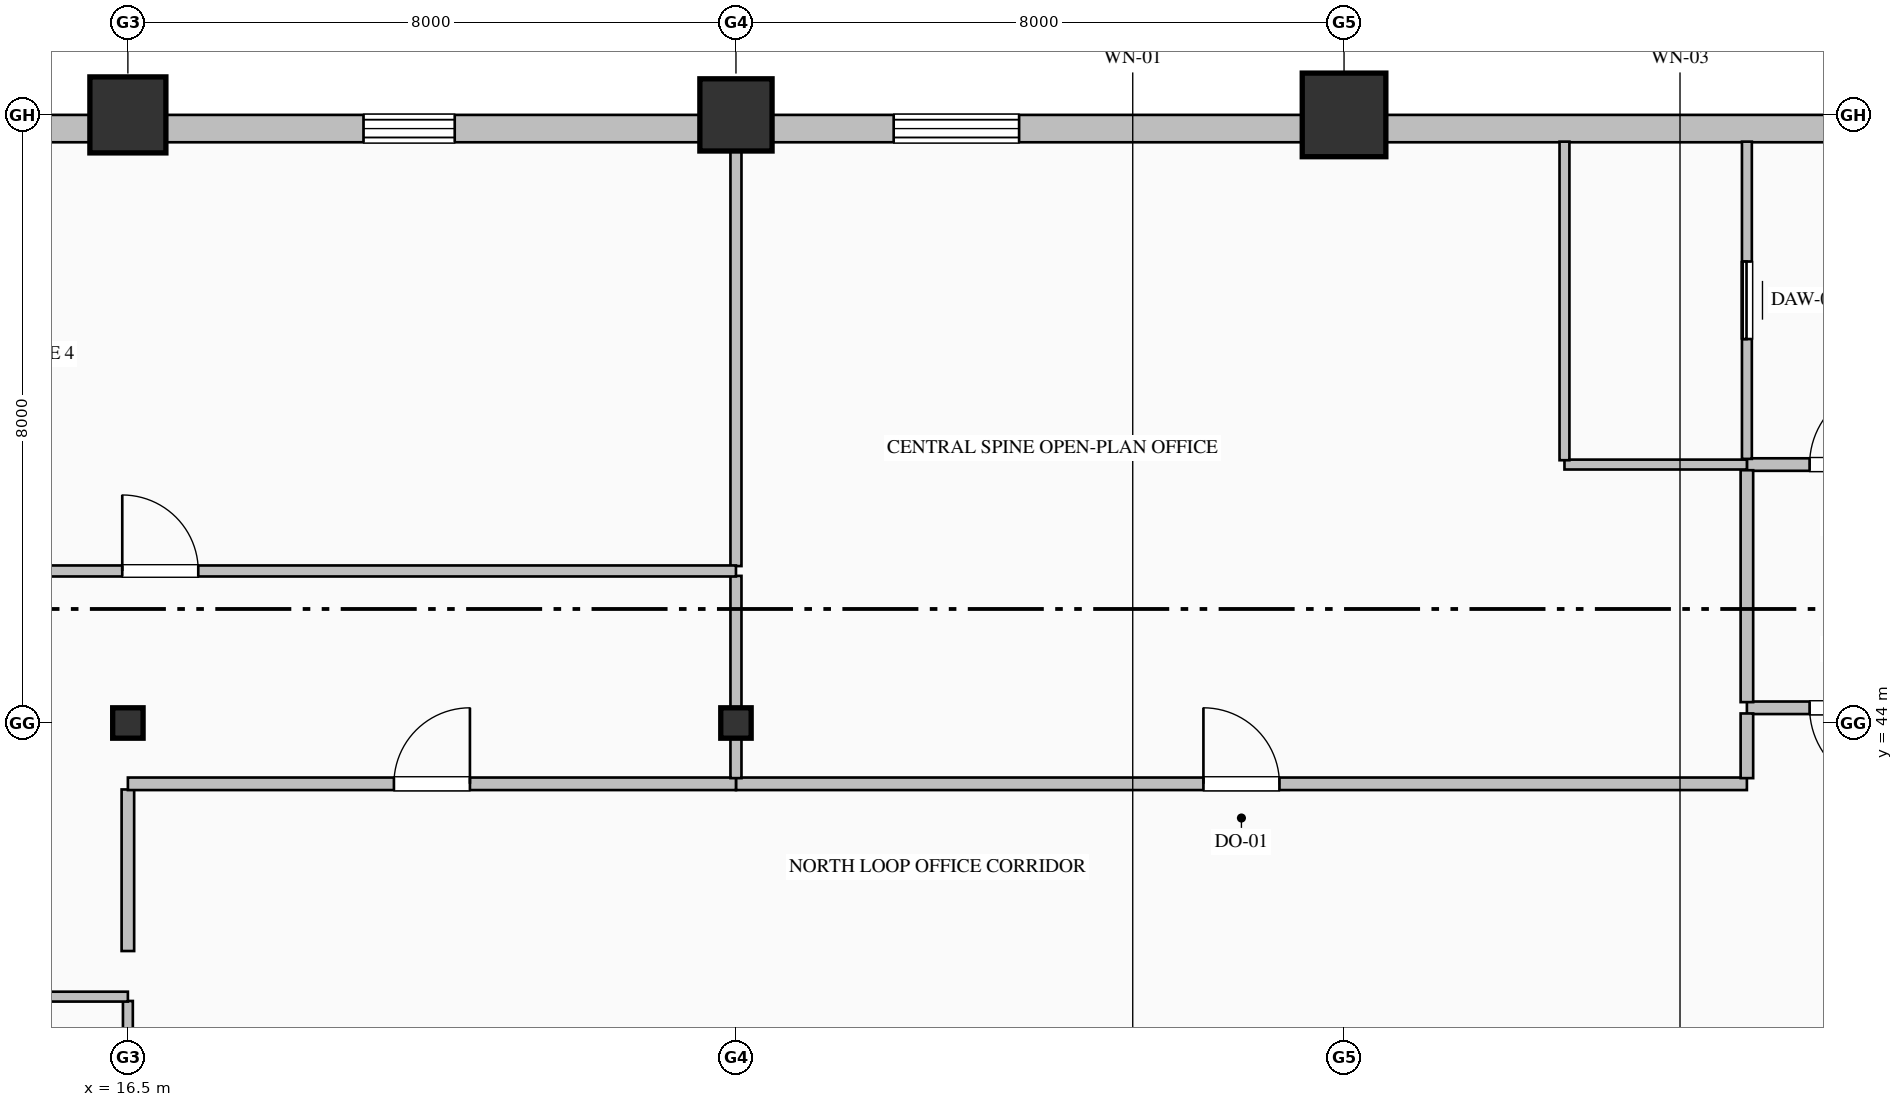
"""IFC4 building model, lengths in metres.
Left out: names, types, materials, properties, quantities, classifications, styles, units other than length and angle.
Written with IfcOpenShell. Run it as: python <this file> out.ifc"""

import sys

from ifc_helpers import new_model, si_unit, direction, frame, frame_2d, origin, origin_2d, place, context, subcontext, project, spatial, rectangle, hollow_rectangle, hollow_circle, i_section, extrude, element, fill, save


model = new_model("IFC4")
c1 = context("Model", 3, precision=1e-05, world=origin(), true_north=direction((0.0, 1.0)))
c2 = subcontext(c1, "Body", "Model", "MODEL_VIEW")
j1 = project(units=[si_unit("LENGTHUNIT", "METRE"), si_unit("PLANEANGLEUNIT", "RADIAN")], contexts=[c1])
p1 = place(None, origin())
s1 = spatial("IfcSite", under=j1, at=p1, CompositionType="ELEMENT")
p2 = place(p1, origin())
s2 = spatial("IfcBuilding", under=s1, at=p2, CompositionType="ELEMENT")
p3 = place(p2, frame((0.0, 0.0, 159.0)))
s3 = spatial("IfcBuildingStorey", under=s2, at=p3, CompositionType="ELEMENT", Elevation=159.0)
p4 = place(p3, frame((16.5, 44.0, 0.0), z_axis=(0.0, 0.0, 1.0), x_axis=(1.0, 0.0, 0.0)))
e1 = element("IfcColumn", 1, at=p4, inside=s3, PredefinedType="COLUMN", context=c2, shape_type="SweptSolid", body=[
    extrude(i_section(OverallWidth=0.4, OverallDepth=0.4, WebThickness=0.013, FlangeThickness=0.021, FilletRadius=0.022, at=origin_2d()), origin(), (0.0, 0.0, 1.0), 4.0),
])
p5 = place(p3, frame((16.5, 52.0, 0.0), z_axis=(0.0, 0.0, 1.0), x_axis=(1.0, 0.0, 0.0)))
e2 = element("IfcColumn", 2, at=p5, inside=s3, PredefinedType="COLUMN", context=c2, shape_type="SweptSolid", body=[
    extrude(hollow_circle(Radius=0.5, WallThickness=0.036, at=origin_2d()), origin(), (0.0, 0.0, 1.0), 4.0),
])
p6 = place(p3, frame((24.5, 44.0, 0.0), z_axis=(0.0, 0.0, 1.0), x_axis=(1.0, 0.0, 0.0)))
e3 = element("IfcColumn", 3, at=p6, inside=s3, PredefinedType="COLUMN", context=c2, shape_type="SweptSolid", body=[
    extrude(i_section(OverallWidth=0.4, OverallDepth=0.4, WebThickness=0.013, FlangeThickness=0.021, FilletRadius=0.022, at=origin_2d()), origin(), (0.0, 0.0, 1.0), 4.0),
])
p7 = place(p3, frame((24.5, 52.0, 0.0), z_axis=(0.0, 0.0, 1.0), x_axis=(1.0, 0.0, 0.0)))
e4 = element("IfcColumn", 4, at=p7, inside=s3, PredefinedType="COLUMN", context=c2, shape_type="SweptSolid", body=[
    extrude(hollow_rectangle(XDim=0.95, YDim=0.95, WallThickness=0.036, at=origin_2d()), origin(), (0.0, 0.0, 1.0), 4.0),
])
p8 = place(p3, frame((32.5, 52.0, 0.0), z_axis=(0.0, 0.0, 1.0), x_axis=(1.0, 0.0, 0.0)))
e5 = element("IfcColumn", 5, at=p8, inside=s3, PredefinedType="COLUMN", context=c2, shape_type="SweptSolid", body=[
    extrude(hollow_rectangle(XDim=1.1, YDim=1.1, WallThickness=0.04, at=origin_2d()), origin(), (0.0, 0.0, 1.0), 4.0),
])
p9 = place(p3, frame((13.0, 51.82, 0.0), z_axis=(0.0, 0.0, 1.0), x_axis=(1.0, 0.0, 0.0)))
e6 = element("IfcWall", 6, at=p9, inside=s3, PredefinedType="SOLIDWALL", context=c2, shape_type="SweptSolid", body=[
    extrude(rectangle(XDim=27.52, YDim=0.36, at=frame_2d((13.76, 0.0))), origin(), (0.0, 0.0, 1.0), 3.265),
])
p10 = place(p9, frame((6.6, 0.0, 0.7)))
e7 = element("IfcOpeningElement", 7, at=p10, cuts=e6, PredefinedType="OPENING", context=c2, shape_type="SweptSolid", body=[
    extrude(rectangle(XDim=1.2, YDim=1.85, at=frame_2d((0.6, 0.925))), frame((0.0, 0.19, 0.0), z_axis=(0.0, -1.0, 0.0), x_axis=(1.0, 0.0, 0.0)), (0.0, 0.0, 1.0), 0.38),
])
p11 = place(p9, frame((13.575, 0.0, 0.85)))
e8 = element("IfcOpeningElement", 8, at=p11, cuts=e6, PredefinedType="OPENING", context=c2, shape_type="SweptSolid", body=[
    extrude(rectangle(XDim=1.65, YDim=1.95, at=frame_2d((0.825, 0.975))), frame((0.0, 0.19, 0.0), z_axis=(0.0, -1.0, 0.0), x_axis=(1.0, 0.0, 0.0)), (0.0, 0.0, 1.0), 0.38),
])
p12 = place(p3, frame((37.8, 47.4, 0.0), z_axis=(0.0, 0.0, 1.0), x_axis=(1.0, 0.0, 0.0)))
e9 = element("IfcWall", 9, at=p12, inside=s3, PredefinedType="PARTITIONING", context=c2, shape_type="SweptSolid", body=[
    extrude(rectangle(XDim=2.7, YDim=0.165, at=frame_2d((1.35, 0.0))), origin(), (0.0, 0.0, 1.0), 3.765),
])
p13 = place(p12, frame((0.825, 0.0, 0.0)))
e10 = element("IfcOpeningElement", 10, at=p13, cuts=e9, PredefinedType="OPENING", context=c2, shape_type="SweptSolid", body=[
    extrude(rectangle(XDim=1.05, YDim=2.15, at=frame_2d((0.525, 1.075))), frame((0.0, 0.093, 0.0), z_axis=(0.0, -1.0, 0.0), x_axis=(1.0, 0.0, 0.0)), (0.0, 0.0, 1.0), 0.185),
])
p14 = place(p3, frame((40.5, 44.2, 0.0), z_axis=(0.0, 0.0, 1.0), x_axis=(-1.0, 0.0, 0.0)))
e11 = element("IfcWall", 11, at=p14, inside=s3, PredefinedType="PARTITIONING", context=c2, shape_type="SweptSolid", body=[
    extrude(rectangle(XDim=2.7, YDim=0.165, at=frame_2d((1.35, 0.0))), origin(), (0.0, 0.0, 1.0), 3.765),
])
p15 = place(p14, frame((0.825, 0.0, 0.0)))
e12 = element("IfcOpeningElement", 12, at=p15, cuts=e11, PredefinedType="OPENING", context=c2, shape_type="SweptSolid", body=[
    extrude(rectangle(XDim=1.05, YDim=2.15, at=frame_2d((0.525, 1.075))), frame((0.0, 0.093, 0.0), z_axis=(0.0, -1.0, 0.0), x_axis=(1.0, 0.0, 0.0)), (0.0, 0.0, 1.0), 0.185),
])
p16 = place(p3, frame((37.8, 44.274, 0.0), z_axis=(0.0, 0.0, 1.0), x_axis=(0.0, 1.0, 0.0)))
e13 = element("IfcWall", 13, at=p16, inside=s3, PredefinedType="PARTITIONING", context=c2, shape_type="SweptSolid", body=[
    extrude(rectangle(XDim=3.051, YDim=0.165, at=frame_2d((1.525, 0.0))), origin(), (0.0, 0.0, 1.0), 3.765),
])
p17 = place(p3, frame((37.8, 47.475, 0.0), z_axis=(0.0, 0.0, 1.0), x_axis=(0.0, 1.0, 0.0)))
e14 = element("IfcWall", 14, at=p17, inside=s3, PredefinedType="PARTITIONING", context=c2, shape_type="SweptSolid", body=[
    extrude(rectangle(XDim=4.173, YDim=0.13, at=frame_2d((2.087, 0.0))), origin(), (0.0, 0.0, 1.0), 3.765),
])
p18 = place(p17, frame((1.577, 0.0, 0.0)))
e15 = element("IfcOpeningElement", 15, at=p18, cuts=e14, PredefinedType="OPENING", context=c2, shape_type="SweptSolid", body=[
    extrude(rectangle(XDim=1.02, YDim=2.15, at=frame_2d((0.51, 1.075))), frame((0.0, 0.075, 0.0), z_axis=(0.0, -1.0, 0.0), x_axis=(1.0, 0.0, 0.0)), (0.0, 0.0, 1.0), 0.15),
])
p19 = place(p3, frame((37.8, 47.4, 0.0), z_axis=(0.0, 0.0, 1.0), x_axis=(-1.0, 0.0, 0.0)))
e16 = element("IfcWall", 16, at=p19, inside=s3, PredefinedType="PARTITIONING", context=c2, shape_type="SweptSolid", body=[
    extrude(rectangle(XDim=2.4, YDim=0.13, at=frame_2d((1.2, 0.0))), origin(), (0.0, 0.0, 1.0), 3.765),
])
p20 = place(p3, frame((35.4, 47.457, 0.0), z_axis=(0.0, 0.0, 1.0), x_axis=(0.0, 1.0, 0.0)))
e17 = element("IfcWall", 17, at=p20, inside=s3, PredefinedType="PARTITIONING", context=c2, shape_type="SweptSolid", body=[
    extrude(rectangle(XDim=4.191, YDim=0.13, at=frame_2d((2.095, 0.0))), origin(), (0.0, 0.0, 1.0), 3.765),
])
p21 = place(p3, frame((24.5, 43.2, 0.0), z_axis=(0.0, 0.0, 1.0), x_axis=(1.0, 0.0, 0.0)))
e18 = element("IfcWall", 18, at=p21, inside=s3, PredefinedType="PARTITIONING", context=c2, shape_type="SweptSolid", body=[
    extrude(rectangle(XDim=13.3, YDim=0.165, at=frame_2d((6.65, 0.0))), origin(), (0.0, 0.0, 1.0), 3.765),
])
p22 = place(p21, frame((6.15, 0.0, 0.0)))
e19 = element("IfcOpeningElement", 19, at=p22, cuts=e18, PredefinedType="OPENING", context=c2, shape_type="SweptSolid", body=[
    extrude(rectangle(XDim=1.0, YDim=2.15, at=frame_2d((0.5, 1.075))), frame((0.0, 0.093, 0.0), z_axis=(0.0, -1.0, 0.0), x_axis=(1.0, 0.0, 0.0)), (0.0, 0.0, 1.0), 0.185),
])
p23 = place(p3, frame((16.5, 41.0, 0.0), z_axis=(0.0, 0.0, 1.0), x_axis=(0.0, 1.0, 0.0)))
e20 = element("IfcWall", 20, at=p23, inside=s3, PredefinedType="PARTITIONING", context=c2, shape_type="SweptSolid", body=[
    extrude(rectangle(XDim=2.125, YDim=0.165, at=frame_2d((1.063, 0.0))), origin(), (0.0, 0.0, 1.0), 3.157),
])
p24 = place(p3, frame((16.5, 43.2, 0.0), z_axis=(0.0, 0.0, 1.0), x_axis=(1.0, 0.0, 0.0)))
e21 = element("IfcWall", 21, at=p24, inside=s3, PredefinedType="PARTITIONING", context=c2, shape_type="SweptSolid", body=[
    extrude(rectangle(XDim=8.0, YDim=0.165, at=frame_2d((4.0, 0.0))), origin(), (0.0, 0.0, 1.0), 3.765),
])
p25 = place(p24, frame((3.5, 0.0, 0.0)))
e22 = element("IfcOpeningElement", 22, at=p25, cuts=e21, PredefinedType="OPENING", context=c2, shape_type="SweptSolid", body=[
    extrude(rectangle(XDim=1.0, YDim=2.15, at=frame_2d((0.5, 1.075))), frame((0.0, 0.093, 0.0), z_axis=(0.0, -1.0, 0.0), x_axis=(1.0, 0.0, 0.0)), (0.0, 0.0, 1.0), 0.185),
])
p26 = place(p3, frame((16.5, 34.057, 0.0), z_axis=(0.0, 0.0, 1.0), x_axis=(0.0, 1.0, 0.0)))
e23 = element("IfcWall", 23, at=p26, inside=s3, PredefinedType="PARTITIONING", context=c2, shape_type="SweptSolid", body=[
    extrude(rectangle(XDim=6.286, YDim=0.13, at=frame_2d((3.143, 0.0))), origin(), (0.0, 0.0, 1.0), 3.157),
])
p27 = place(p26, frame((2.643, 0.0, 0.0)))
e24 = element("IfcOpeningElement", 24, at=p27, cuts=e23, PredefinedType="OPENING", context=c2, shape_type="SweptSolid", body=[
    extrude(rectangle(XDim=1.0, YDim=2.15, at=frame_2d((0.5, 1.075))), frame((0.0, 0.075, 0.0), z_axis=(0.0, -1.0, 0.0), x_axis=(1.0, 0.0, 0.0)), (0.0, 0.0, 1.0), 0.15),
])
p28 = place(p3, frame((37.8, 43.274, 0.0), z_axis=(0.0, 0.0, 1.0), x_axis=(0.0, 1.0, 0.0)))
e25 = element("IfcWall", 25, at=p28, inside=s3, PredefinedType="PARTITIONING", context=c2, shape_type="SweptSolid", body=[
    extrude(rectangle(XDim=0.851, YDim=0.165, at=frame_2d((0.426, 0.0))), origin(), (0.0, 0.0, 1.0), 3.765),
])
p29 = place(p3, frame((24.5, 43.274, 0.0), z_axis=(0.0, 0.0, 1.0), x_axis=(0.0, 1.0, 0.0)))
e26 = element("IfcWall", 26, at=p29, inside=s3, PredefinedType="PARTITIONING", context=c2, shape_type="SweptSolid", body=[
    extrude(rectangle(XDim=2.661, YDim=0.145, at=frame_2d((1.331, 0.0))), origin(), (0.0, 0.0, 1.0), 3.157),
])
p30 = place(p3, frame((24.5, 46.064, 0.0), z_axis=(0.0, 0.0, 1.0), x_axis=(0.0, 1.0, 0.0)))
e27 = element("IfcWall", 27, at=p30, inside=s3, PredefinedType="PARTITIONING", context=c2, shape_type="SweptSolid", body=[
    extrude(rectangle(XDim=5.583, YDim=0.145, at=frame_2d((2.792, 0.0))), origin(), (0.0, 0.0, 1.0), 3.157),
])
p31 = place(p3, frame((9.352, 40.4, 0.0), z_axis=(0.0, 0.0, 1.0), x_axis=(1.0, 0.0, 0.0)))
e28 = element("IfcWall", 28, at=p31, inside=s3, PredefinedType="PARTITIONING", context=c2, shape_type="SweptSolid", body=[
    extrude(rectangle(XDim=7.148, YDim=0.13, at=frame_2d((3.574, 0.0))), origin(), (0.0, 0.0, 1.0), 3.765),
])
p32 = place(p3, frame((9.352, 46.0, 0.0), z_axis=(0.0, 0.0, 1.0), x_axis=(1.0, 0.0, 0.0)))
e29 = element("IfcWall", 29, at=p32, inside=s3, PredefinedType="PARTITIONING", context=c2, shape_type="SweptSolid", body=[
    extrude(rectangle(XDim=15.148, YDim=0.145, at=frame_2d((7.574, 0.0))), origin(), (0.0, 0.0, 1.0), 3.765),
])
p33 = place(p32, frame((7.074, 0.0, 0.0)))
e30 = element("IfcOpeningElement", 30, at=p33, cuts=e29, PredefinedType="OPENING", context=c2, shape_type="SweptSolid", body=[
    extrude(rectangle(XDim=1.0, YDim=2.15, at=frame_2d((0.5, 1.075))), frame((0.0, 0.083, 0.0), z_axis=(0.0, -1.0, 0.0), x_axis=(1.0, 0.0, 0.0)), (0.0, 0.0, 1.0), 0.165),
])
p34 = place(p10, origin())
e31 = element("IfcWindow", 31, at=p34, inside=s3, PartitioningType="DOUBLE_PANEL_VERTICAL", PredefinedType="WINDOW", context=c2, shape_type="SweptSolid", body=[
    extrude(rectangle(XDim=1.2, YDim=1.85, at=frame_2d((0.6, 0.925))), frame((0.0, 0.15, 0.0), z_axis=(0.0, -1.0, 0.0), x_axis=(1.0, 0.0, 0.0)), (0.0, 0.0, 1.0), 0.06),
])
fill(e7, e31)
p35 = place(p11, origin())
e32 = element("IfcWindow", 32, at=p35, inside=s3, PartitioningType="DOUBLE_PANEL_VERTICAL", PredefinedType="WINDOW", context=c2, shape_type="SweptSolid", body=[
    extrude(rectangle(XDim=1.65, YDim=1.95, at=frame_2d((0.825, 0.975))), frame((0.0, 0.15, 0.0), z_axis=(0.0, -1.0, 0.0), x_axis=(1.0, 0.0, 0.0)), (0.0, 0.0, 1.0), 0.06),
])
fill(e8, e32)
p36 = place(p13, origin())
e33 = element("IfcDoor", 33, at=p36, inside=s3, OperationType="SINGLE_SWING_RIGHT", PredefinedType="DOOR", context=c2, shape_type="SweptSolid", body=[
    extrude(rectangle(XDim=1.05, YDim=2.15, at=frame_2d((0.525, 1.075))), frame((0.0, 0.025, 0.0), z_axis=(0.0, -1.0, 0.0), x_axis=(1.0, 0.0, 0.0)), (0.0, 0.0, 1.0), 0.05),
])
fill(e10, e33)
p37 = place(p15, origin())
e34 = element("IfcDoor", 34, at=p37, inside=s3, OperationType="SINGLE_SWING_LEFT", PredefinedType="DOOR", context=c2, shape_type="SweptSolid", body=[
    extrude(rectangle(XDim=1.05, YDim=2.15, at=frame_2d((0.525, 1.075))), frame((0.0, 0.025, 0.0), z_axis=(0.0, -1.0, 0.0), x_axis=(1.0, 0.0, 0.0)), (0.0, 0.0, 1.0), 0.05),
])
fill(e12, e34)
p38 = place(p18, origin())
e35 = element("IfcDoor", 35, at=p38, inside=s3, OperationType="SLIDING_TO_LEFT", PredefinedType="DOOR", context=c2, shape_type="SweptSolid", body=[
    extrude(rectangle(XDim=1.02, YDim=2.15, at=frame_2d((0.51, 1.075))), frame((0.0, 0.025, 0.0), z_axis=(0.0, -1.0, 0.0), x_axis=(1.0, 0.0, 0.0)), (0.0, 0.0, 1.0), 0.05),
])
fill(e15, e35)
p39 = place(p22, origin())
e36 = element("IfcDoor", 36, at=p39, inside=s3, OperationType="SINGLE_SWING_LEFT", PredefinedType="DOOR", context=c2, shape_type="SweptSolid", body=[
    extrude(rectangle(XDim=1.0, YDim=2.15, at=frame_2d((0.5, 1.075))), frame((0.0, 0.025, 0.0), z_axis=(0.0, -1.0, 0.0), x_axis=(1.0, 0.0, 0.0)), (0.0, 0.0, 1.0), 0.05),
])
fill(e19, e36)
p40 = place(p25, origin())
e37 = element("IfcDoor", 37, at=p40, inside=s3, OperationType="SINGLE_SWING_RIGHT", PredefinedType="DOOR", context=c2, shape_type="SweptSolid", body=[
    extrude(rectangle(XDim=1.0, YDim=2.15, at=frame_2d((0.5, 1.075))), frame((0.0, 0.025, 0.0), z_axis=(0.0, -1.0, 0.0), x_axis=(1.0, 0.0, 0.0)), (0.0, 0.0, 1.0), 0.05),
])
fill(e22, e37)
p41 = place(p33, origin())
e38 = element("IfcDoor", 38, at=p41, inside=s3, OperationType="SINGLE_SWING_LEFT", PredefinedType="DOOR", context=c2, shape_type="SweptSolid", body=[
    extrude(rectangle(XDim=1.0, YDim=2.15, at=frame_2d((0.5, 1.075))), frame((0.0, 0.025, 0.0), z_axis=(0.0, -1.0, 0.0), x_axis=(1.0, 0.0, 0.0)), (0.0, 0.0, 1.0), 0.05),
])
fill(e30, e38)
save(model, sys.argv[1])
